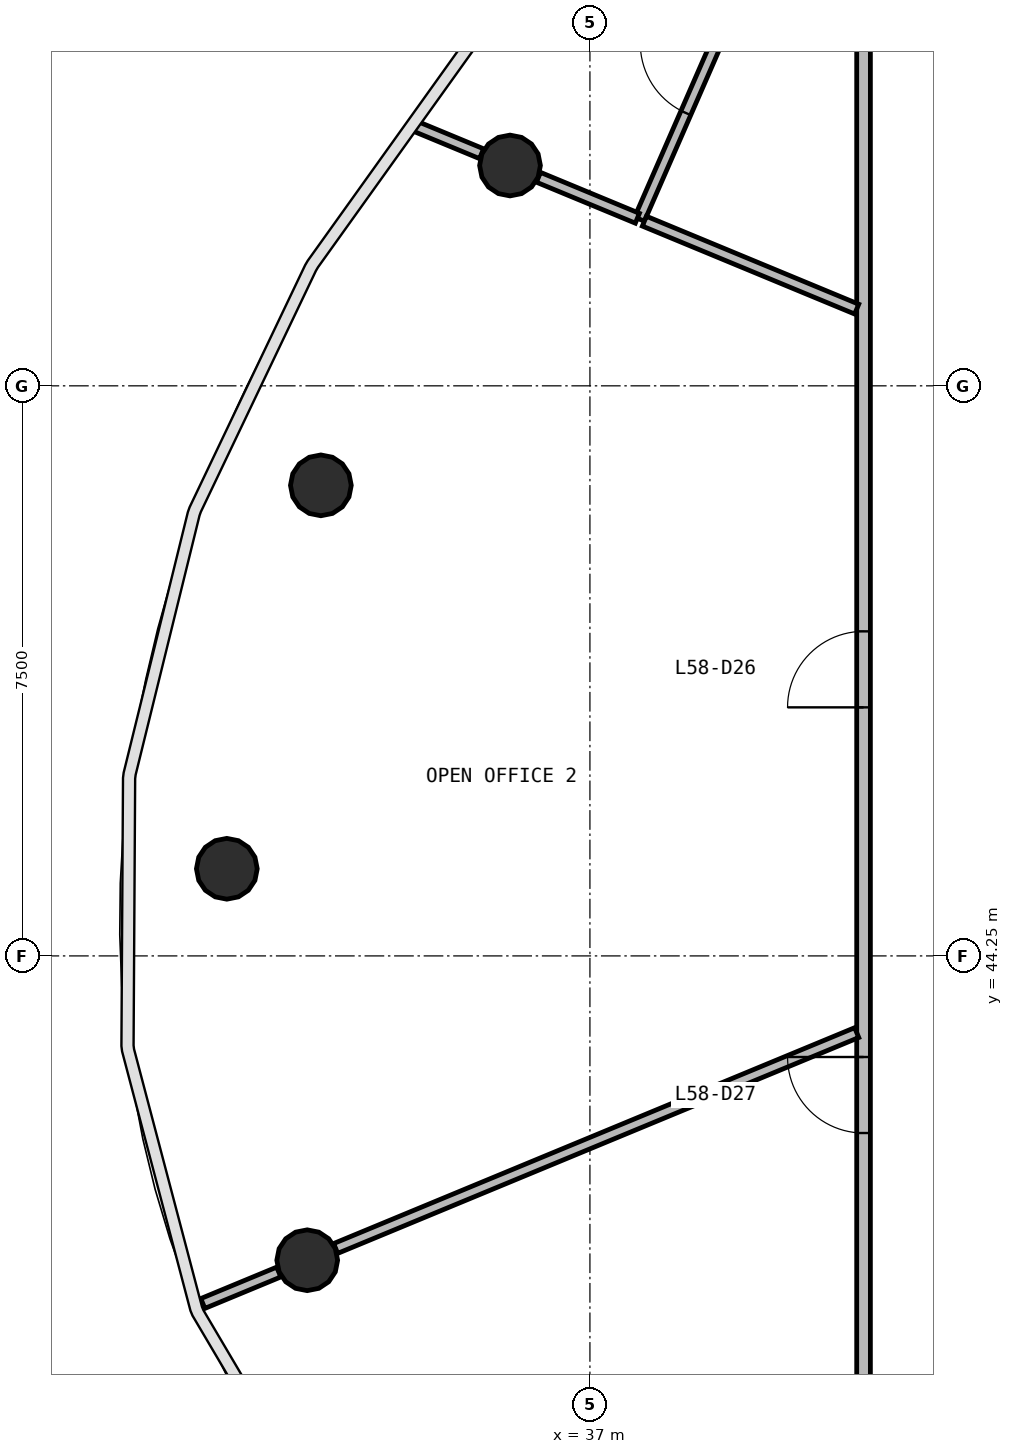
"""IFC4 building model, lengths in metres.
Left out: names, types, materials, properties, quantities, classifications, styles, units other than length and angle.
Written with IfcOpenShell. Run it as: python <this file> out.ifc"""

import sys

from ifc_helpers import new_model, si_unit, direction, frame, frame_2d, origin, origin_2d, place, context, subcontext, project, spatial, rectangle, circle, extrude, source, transform, mapped, element, fill, save


model = new_model("IFC4")
c1 = context("Model", 3, precision=1e-05, world=origin(), true_north=direction((0.0, 1.0)))
c2 = subcontext(c1, "Body", "Model", "MODEL_VIEW")
j1 = project(units=[si_unit("LENGTHUNIT", "METRE"), si_unit("PLANEANGLEUNIT", "RADIAN")], contexts=[c1])
p1 = place(None, origin())
s1 = spatial("IfcSite", under=j1, at=p1, CompositionType="ELEMENT")
p2 = place(p1, origin())
s2 = spatial("IfcBuilding", under=s1, at=p2, CompositionType="ELEMENT")
p3 = place(p2, frame((0.0, 0.0, 238.4)))
s3 = spatial("IfcBuildingStorey", under=s2, at=p3, CompositionType="ELEMENT", Elevation=238.4)
m1 = source(origin(), c2, "Body", "SweptSolid", [
    extrude(circle(Radius=0.4, at=origin_2d()), origin(), (0.0, 0.0, 1.0), 3.9),
])
for number, where, z_axis, x_axis in (
    (1, (35.948, 54.649, 0.0), (0.0, 0.0, 1.0), (1.0, 0.0, 0.0)),
    (2, (33.46, 50.441, 0.0), (0.0, 0.0, 1.0), (1.0, 0.0, 0.0)),
    (3, (32.223, 45.396, 0.0), (0.0, 0.0, 1.0), (1.0, 0.0, 0.0)),
    (4, (33.281, 40.246, 0.0), (0.0, 0.0, 1.0), (1.0, 0.0, 0.0)),
):
    element("IfcColumn", number, at=place(p3, frame(where, z_axis=z_axis, x_axis=x_axis)), inside=s3, PredefinedType="COLUMN", context=c2, shape_type="MappedRepresentation", body=[
        mapped(m1, transform((0.0, 0.0, 0.0), scale=1.0)),
    ])
p4 = place(p3, frame((40.6, 37.63, 0.0), z_axis=(0.0, 0.0, 1.0), x_axis=(0.0, 1.0, 0.0)))
e5 = element("IfcWall", 5, at=p4, inside=s3, PredefinedType="PARTITIONING", context=c2, shape_type="SweptSolid", body=[
    extrude(rectangle(XDim=20.74, YDim=0.18, at=frame_2d((10.37, 0.0))), origin(), (0.0, 0.0, 1.0), 2.88),
])
p5 = place(p4, frame((9.89, 0.0, 0.0)))
e6 = element("IfcOpeningElement", 6, at=p5, cuts=e5, PredefinedType="OPENING", context=c2, shape_type="SweptSolid", body=[
    extrude(rectangle(XDim=1.0, YDim=2.1, at=frame_2d((0.5, 1.05))), frame((0.0, 0.1, 0.0), z_axis=(0.0, -1.0, 0.0), x_axis=(1.0, 0.0, 0.0)), (0.0, 0.0, 1.0), 0.2),
])
p6 = place(p4, frame((4.29, 0.0, 0.0)))
e7 = element("IfcOpeningElement", 7, at=p6, cuts=e5, PredefinedType="OPENING", context=c2, shape_type="SweptSolid", body=[
    extrude(rectangle(XDim=1.0, YDim=2.1, at=frame_2d((0.5, 1.05))), frame((0.0, 0.1, 0.0), z_axis=(0.0, -1.0, 0.0), x_axis=(1.0, 0.0, 0.0)), (0.0, 0.0, 1.0), 0.2),
])
p7 = place(p3, frame((40.51, 43.241, 0.0), z_axis=(0.0, 0.0, 1.0), x_axis=(-0.92388089155, -0.38268015134, 0.0)))
e8 = element("IfcWall", 8, at=p7, inside=s3, PredefinedType="PARTITIONING", context=c2, shape_type="SweptSolid", body=[
    extrude(rectangle(XDim=7.42, YDim=0.14, at=frame_2d((3.71, 0.0))), origin(), (0.0, 0.0, 1.0), 2.88),
])
p8 = place(p3, frame((37.652, 53.943, 0.0), z_axis=(0.0, 0.0, 1.0), x_axis=(0.400345057701, 0.916364466124, 0.0)))
e9 = element("IfcWall", 9, at=p8, inside=s3, PredefinedType="PARTITIONING", context=c2, shape_type="SweptSolid", body=[
    extrude(rectangle(XDim=3.974, YDim=0.14, at=frame_2d((1.987, 0.0))), origin(), (0.0, 0.0, 1.0), 2.88),
])
p9 = place(p8, frame((1.524, 0.0, 0.0)))
e10 = element("IfcOpeningElement", 10, at=p9, cuts=e9, PredefinedType="OPENING", context=c2, shape_type="SweptSolid", body=[
    extrude(rectangle(XDim=1.0, YDim=2.1, at=frame_2d((0.5, 1.05))), frame((0.0, 0.08, 0.0), z_axis=(0.0, -1.0, 0.0), x_axis=(1.0, 0.0, 0.0)), (0.0, 0.0, 1.0), 0.16),
])
p10 = place(p3, frame((40.51, 52.759, 0.0), z_axis=(0.0, 0.0, 1.0), x_axis=(-0.923863305003, 0.382722606687, 0.0)))
e11 = element("IfcWall", 11, at=p10, inside=s3, PredefinedType="PARTITIONING", context=c2, shape_type="SweptSolid", body=[
    extrude(rectangle(XDim=3.024, YDim=0.14, at=frame_2d((1.512, 0.0))), origin(), (0.0, 0.0, 1.0), 2.88),
])
p11 = place(p3, frame((37.624, 53.955, 0.0), z_axis=(0.0, 0.0, 1.0), x_axis=(-0.923828824713, 0.382805828886, 0.0)))
e12 = element("IfcWall", 12, at=p11, inside=s3, PredefinedType="PARTITIONING", context=c2, shape_type="SweptSolid", body=[
    extrude(rectangle(XDim=1.409, YDim=0.14, at=frame_2d((0.705, 0.0))), origin(), (0.0, 0.0, 1.0), 2.88),
])
p12 = place(p3, frame((32.906, 40.091, 0.0), z_axis=(0.0, 0.0, 1.0), x_axis=(-0.923862802911, -0.382723818695, 0.0)))
e13 = element("IfcWall", 13, at=p12, inside=s3, PredefinedType="PARTITIONING", context=c2, shape_type="SweptSolid", body=[
    extrude(rectangle(XDim=1.082, YDim=0.14, at=frame_2d((0.541, 0.0))), origin(), (0.0, 0.0, 1.0), 2.88),
])
p13 = place(p3, frame((35.574, 54.804, 0.0), z_axis=(0.0, 0.0, 1.0), x_axis=(-0.923887369877, 0.382664510743, 0.0)))
e14 = element("IfcWall", 14, at=p13, inside=s3, PredefinedType="PARTITIONING", context=c2, shape_type="SweptSolid", body=[
    extrude(rectangle(XDim=0.942, YDim=0.14, at=frame_2d((0.471, 0.0))), origin(), (0.0, 0.0, 1.0), 2.88),
])
m2 = source(origin(), c2, "Body", "SweptSolid", [
    extrude(rectangle(XDim=1.0, YDim=2.1, at=frame_2d((0.5, 1.05))), frame((0.0, 0.025, 0.0), z_axis=(0.0, -1.0, 0.0), x_axis=(1.0, 0.0, 0.0)), (0.0, 0.0, 1.0), 0.05),
])
p14 = place(p9, origin())
e15 = element("IfcDoor", 15, at=p14, inside=s3, OperationType="SINGLE_SWING_RIGHT", PredefinedType="DOOR", context=c2, shape_type="MappedRepresentation", body=[
    mapped(m2, transform((0.0, 0.0, 0.0), scale=1.0)),
])
fill(e10, e15)
p15 = place(p5, origin())
e16 = element("IfcDoor", 16, at=p15, inside=s3, OperationType="SINGLE_SWING_LEFT", PredefinedType="DOOR", context=c2, shape_type="MappedRepresentation", body=[
    mapped(m2, transform((0.0, 0.0, 0.0), scale=1.0)),
])
fill(e6, e16)
p16 = place(p6, origin())
e17 = element("IfcDoor", 17, at=p16, inside=s3, OperationType="SINGLE_SWING_RIGHT", PredefinedType="DOOR", context=c2, shape_type="MappedRepresentation", body=[
    mapped(m2, transform((0.0, 0.0, 0.0), scale=1.0)),
])
fill(e7, e17)
save(model, sys.argv[1])
